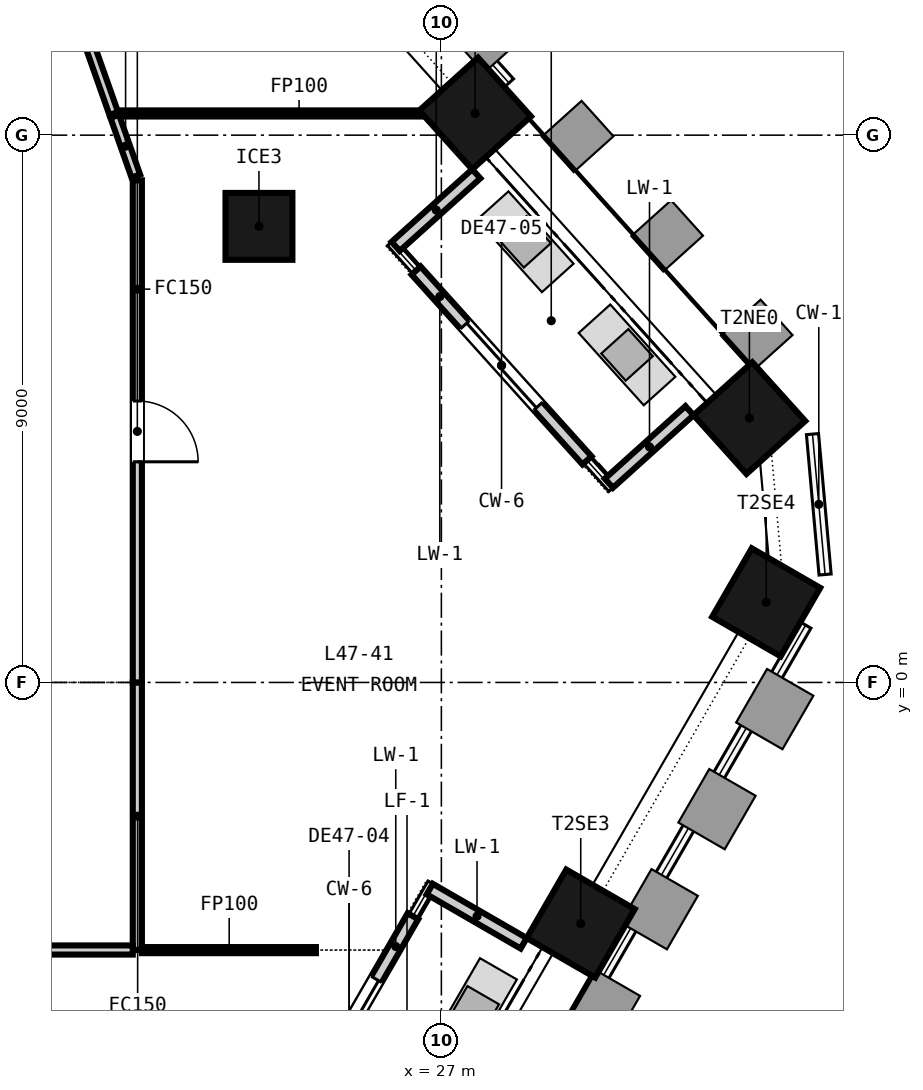
"""IFC4 building model, lengths in metres.
Left out: names, types, materials, properties, quantities, classifications, styles, units other than length and angle.
Written with IfcOpenShell. Run it as: python <this file> out.ifc"""

import sys

from ifc_helpers import new_model, si_unit, direction, frame, frame_2d, origin, origin_2d, place, context, subcontext, project, spatial, rectangle, extrude, element, fill, save


model = new_model("IFC4")
c1 = context("Model", 3, precision=1e-05, world=origin(), true_north=direction((0.0, 1.0)))
c2 = subcontext(c1, "Body", "Model", "MODEL_VIEW")
j1 = project(units=[si_unit("LENGTHUNIT", "METRE"), si_unit("PLANEANGLEUNIT", "RADIAN")], contexts=[c1])
p1 = place(None, origin())
s1 = spatial("IfcSite", under=j1, at=p1, CompositionType="ELEMENT")
p2 = place(p1, origin())
s2 = spatial("IfcBuilding", under=s1, at=p2, CompositionType="ELEMENT")
p3 = place(p2, frame((0.0, 0.0, 189.05)))
s3 = spatial("IfcBuildingStorey", under=s2, at=p3, CompositionType="ELEMENT", Elevation=189.05)
for number, where, z_axis, x_axis in (
    (1, (29.292, -3.965, -0.15), (0.0, 0.0, 1.0), (0.5, 0.866, 0.0)),
    (2, (32.342, 1.318, -0.15), (0.0, 0.0, 1.0), (0.5, 0.866, 0.0)),
    (3, (32.065, 4.347, -0.15), (0.0, 0.0, 1.0), (-0.669, 0.743, 0.0)),
    (4, (27.555, 9.357, -0.15), (0.0, 0.0, 1.0), (-0.669, 0.743, 0.0)),
):
    element("IfcColumn", number, at=place(p3, frame(where, z_axis=z_axis, x_axis=x_axis)), inside=s3, PredefinedType="COLUMN", context=c2, shape_type="SweptSolid", body=[
        extrude(rectangle(XDim=1.3, YDim=1.3, at=origin_2d()), origin(), (0.0, 0.0, 1.0), 3.65),
    ])
p4 = place(p3, frame((24.0, 7.5, -0.15), z_axis=(0.0, 0.0, 1.0), x_axis=(1.0, 0.0, 0.0)))
e5 = element("IfcColumn", 5, at=p4, inside=s3, PredefinedType="COLUMN", context=c2, shape_type="SweptSolid", body=[
    extrude(rectangle(XDim=1.1, YDim=1.1, at=origin_2d()), origin(), (0.0, 0.0, 1.0), 3.65),
])
p5 = place(p3, frame((24.432, -7.482, 0.0), z_axis=(0.0, 0.0, 1.0), x_axis=(0.500002543286, 0.866023935413, 0.0)))
e6 = element("IfcWall", 6, at=p5, inside=s3, PredefinedType="SOLIDWALL", context=c2, shape_type="SweptSolid", body=[
    extrude(rectangle(XDim=4.2, YDim=0.2, at=frame_2d((2.1, 0.0))), origin(), (0.0, 0.0, 1.0), 3.049),
])
p6 = place(p5, frame((1.2, 0.0, 0.0)))
e7 = element("IfcOpeningElement", 7, at=p6, cuts=e6, PredefinedType="OPENING", context=c2, shape_type="SweptSolid", body=[
    extrude(rectangle(XDim=1.8, YDim=2.4, at=frame_2d((0.9, 1.2))), frame((0.0, 0.11, 0.0), z_axis=(0.0, -1.0, 0.0), x_axis=(1.0, 0.0, 0.0)), (0.0, 0.0, 1.0), 0.22),
])
p7 = place(p3, frame((28.354, -4.29, 0.0), z_axis=(0.0, 0.0, 1.0), x_axis=(-0.865994143547, 0.500054140411, 0.0)))
e8 = element("IfcWall", 8, at=p7, inside=s3, PredefinedType="SOLIDWALL", context=c2, shape_type="SweptSolid", body=[
    extrude(rectangle(XDim=1.784, YDim=0.2, at=frame_2d((0.892, 0.0))), origin(), (0.0, 0.0, 1.0), 3.05),
])
p8 = place(p3, frame((29.395, 3.652, 0.0), z_axis=(0.0, 0.0, 1.0), x_axis=(-0.669141337337, 0.743135163121, 0.0)))
e9 = element("IfcWall", 9, at=p8, inside=s3, PredefinedType="SOLIDWALL", context=c2, shape_type="SweptSolid", body=[
    extrude(rectangle(XDim=4.2, YDim=0.2, at=frame_2d((2.1, 0.0))), origin(), (0.0, 0.0, 1.0), 2.9),
])
p9 = place(p8, frame((1.2, 0.0, 0.0)))
e10 = element("IfcOpeningElement", 10, at=p9, cuts=e9, PredefinedType="OPENING", context=c2, shape_type="SweptSolid", body=[
    extrude(rectangle(XDim=1.8, YDim=2.4, at=frame_2d((0.9, 1.2))), frame((0.0, 0.11, 0.0), z_axis=(0.0, -1.0, 0.0), x_axis=(1.0, 0.0, 0.0)), (0.0, 0.0, 1.0), 0.22),
])
p10 = place(p3, frame((31.081, 4.47, 0.0), z_axis=(0.0, 0.0, 1.0), x_axis=(-0.743089972274, -0.669191521992, 0.0)))
e11 = element("IfcWall", 11, at=p10, inside=s3, PredefinedType="SOLIDWALL", context=c2, shape_type="SweptSolid", body=[
    extrude(rectangle(XDim=1.784, YDim=0.2, at=frame_2d((0.892, 0.0))), origin(), (0.0, 0.0, 1.0), 3.05),
])
p11 = place(p3, frame((27.574, 8.364, 0.0), z_axis=(0.0, 0.0, 1.0), x_axis=(-0.743158025489, -0.66911594597, 0.0)))
e12 = element("IfcWall", 12, at=p11, inside=s3, PredefinedType="SOLIDWALL", context=c2, shape_type="SweptSolid", body=[
    extrude(rectangle(XDim=1.784, YDim=0.2, at=frame_2d((0.892, 0.0))), origin(), (0.0, 0.0, 1.0), 2.967),
])
p12 = place(p3, frame((22.0, 0.0, 0.0), z_axis=(0.0, 0.0, 1.0), x_axis=(0.0, -1.0, 0.0)))
e13 = element("IfcWall", 13, at=p12, inside=s3, PredefinedType="PARTITIONING", context=c2, shape_type="SweptSolid", body=[
    extrude(rectangle(XDim=4.4, YDim=0.15, at=frame_2d((2.2, 0.0))), origin(), (0.0, 0.0, 1.0), 2.741),
])
p13 = place(p3, frame((21.925, -4.4, 0.0), z_axis=(0.0, 0.0, 1.0), x_axis=(-1.0, 0.0, 0.0)))
e14 = element("IfcWall", 14, at=p13, inside=s3, PredefinedType="PARTITIONING", context=c2, shape_type="SweptSolid", body=[
    extrude(rectangle(XDim=6.925, YDim=0.15, at=frame_2d((3.462, 0.0))), origin(), (0.0, 0.0, 1.0), 2.741),
])
p14 = place(p13, frame((2.562, 0.0, 0.0)))
e15 = element("IfcOpeningElement", 15, at=p14, cuts=e14, PredefinedType="OPENING", context=c2, shape_type="SweptSolid", body=[
    extrude(rectangle(XDim=1.8, YDim=2.1, at=frame_2d((0.9, 1.05))), frame((0.0, 0.085, 0.0), z_axis=(0.0, -1.0, 0.0), x_axis=(1.0, 0.0, 0.0)), (0.0, 0.0, 1.0), 0.17),
])
p15 = place(p3, frame((22.0, 8.257, 0.0), z_axis=(0.0, 0.0, 1.0), x_axis=(0.0, -1.0, 0.0)))
e16 = element("IfcWall", 16, at=p15, inside=s3, PredefinedType="PARTITIONING", context=c2, shape_type="SweptSolid", body=[
    extrude(rectangle(XDim=8.257, YDim=0.15, at=frame_2d((4.128, 0.0))), origin(), (0.0, 0.0, 1.0), 2.741),
])
p16 = place(p15, frame((3.628, 0.0, 0.0)))
e17 = element("IfcOpeningElement", 17, at=p16, cuts=e16, PredefinedType="OPENING", context=c2, shape_type="SweptSolid", body=[
    extrude(rectangle(XDim=1.0, YDim=2.1, at=frame_2d((0.5, 1.05))), frame((0.0, 0.085, 0.0), z_axis=(0.0, -1.0, 0.0), x_axis=(1.0, 0.0, 0.0)), (0.0, 0.0, 1.0), 0.17),
])
p17 = place(p3, frame((19.757, 14.611, 0.0), z_axis=(0.0, 0.0, 1.0), x_axis=(0.332898037941, -0.942962828713, 0.0)))
e18 = element("IfcWall", 18, at=p17, inside=s3, PredefinedType="PARTITIONING", context=c2, shape_type="SweptSolid", body=[
    extrude(rectangle(XDim=5.572, YDim=0.15, at=frame_2d((2.786, 0.0))), origin(), (0.0, 0.0, 1.0), 2.741),
])
p18 = place(p3, frame((21.687, 9.357, 0.0), z_axis=(0.0, 0.0, 1.0), x_axis=(1.0, 0.0, 0.0)))
e19 = element("IfcWall", 19, at=p18, inside=s3, PredefinedType="PARTITIONING", context=c2, shape_type="SweptSolid", body=[
    extrude(rectangle(XDim=5.935, YDim=0.1, at=frame_2d((2.968, 0.0))), origin(), (0.0, 0.0, 1.0), 2.741),
])
p19 = place(p3, frame((21.629, 9.31, 0.0), z_axis=(0.0, 0.0, 1.0), x_axis=(0.33263618507, -0.943055230823, 0.0)))
e20 = element("IfcWall", 20, at=p19, inside=s3, PredefinedType="PARTITIONING", context=c2, shape_type="SweptSolid", body=[
    extrude(rectangle(XDim=1.042, YDim=0.15, at=frame_2d((0.521, 0.0))), origin(), (0.0, 0.0, 1.0), 2.741),
])
p20 = place(p3, frame((22.075, -4.402, 0.0), z_axis=(0.0, 0.0, 1.0), x_axis=(1.0, 0.0, 0.0)))
e21 = element("IfcWall", 21, at=p20, inside=s3, PredefinedType="PARTITIONING", context=c2, shape_type="SweptSolid", body=[
    extrude(rectangle(XDim=2.861, YDim=0.1, at=frame_2d((1.431, 0.0))), origin(), (0.0, 0.0, 1.0), 2.741),
])
p21 = place(p6, origin())
e22 = element("IfcDoor", 22, at=p21, inside=s3, OperationType="SINGLE_SWING_LEFT", PredefinedType="DOOR", context=c2, shape_type="SweptSolid", body=[
    extrude(rectangle(XDim=1.8, YDim=2.4, at=frame_2d((0.9, 1.2))), frame((0.0, 0.025, 0.0), z_axis=(0.0, -1.0, 0.0), x_axis=(1.0, 0.0, 0.0)), (0.0, 0.0, 1.0), 0.05),
])
fill(e7, e22)
p22 = place(p9, origin())
e23 = element("IfcDoor", 23, at=p22, inside=s3, OperationType="SINGLE_SWING_LEFT", PredefinedType="DOOR", context=c2, shape_type="SweptSolid", body=[
    extrude(rectangle(XDim=1.8, YDim=2.4, at=frame_2d((0.9, 1.2))), frame((0.0, 0.025, 0.0), z_axis=(0.0, -1.0, 0.0), x_axis=(1.0, 0.0, 0.0)), (0.0, 0.0, 1.0), 0.05),
])
fill(e10, e23)
p23 = place(p16, origin())
e24 = element("IfcDoor", 24, at=p23, inside=s3, OperationType="SINGLE_SWING_RIGHT", PredefinedType="DOOR", context=c2, shape_type="SweptSolid", body=[
    extrude(rectangle(XDim=1.0, YDim=2.1, at=frame_2d((0.5, 1.05))), frame((0.0, 0.025, 0.0), z_axis=(0.0, -1.0, 0.0), x_axis=(1.0, 0.0, 0.0)), (0.0, 0.0, 1.0), 0.05),
])
fill(e17, e24)
save(model, sys.argv[1])
